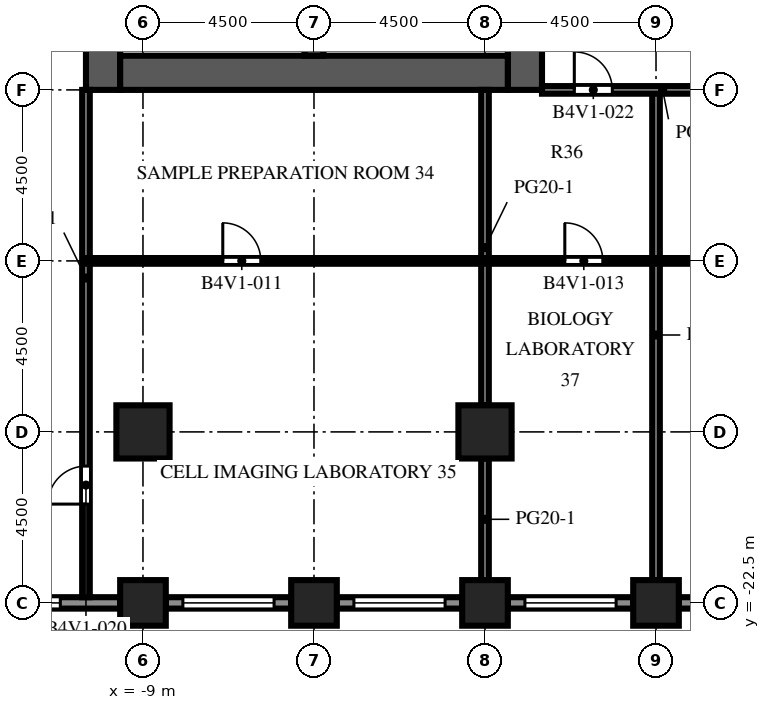
"""IFC4 building model, lengths in metres.
Left out: names, types, materials, properties, quantities, classifications, styles, units other than length and angle.
Written with IfcOpenShell. Run it as: python <this file> out.ifc"""

import sys

from ifc_helpers import new_model, si_unit, direction, frame, frame_2d, origin, origin_2d, place, context, subcontext, project, spatial, rectangle, extrude, element, fill, save


model = new_model("IFC4")
c1 = context("Model", 3, precision=1e-05, world=origin(), true_north=direction((0.0, 1.0)))
c2 = subcontext(c1, "Body", "Model", "MODEL_VIEW")
j1 = project(units=[si_unit("LENGTHUNIT", "METRE"), si_unit("PLANEANGLEUNIT", "RADIAN")], contexts=[c1])
p1 = place(None, origin())
s1 = spatial("IfcSite", under=j1, at=p1, CompositionType="ELEMENT")
p2 = place(p1, origin())
s2 = spatial("IfcBuilding", under=s1, at=p2, CompositionType="ELEMENT")
p3 = place(p2, frame((0.0, 0.0, 129.0)))
s3 = spatial("IfcBuildingStorey", under=s2, at=p3, CompositionType="ELEMENT", Elevation=129.0)
for number, where, z_axis, x_axis in (
    (1, (-9.0, -22.5, 0.0), (0.0, 0.0, 1.0), (1.0, 0.0, 0.0)),
    (2, (-4.5, -22.5, 0.0), (0.0, 0.0, 1.0), (1.0, 0.0, 0.0)),
    (3, (0.0, -22.5, 0.0), (0.0, 0.0, 1.0), (1.0, 0.0, 0.0)),
    (4, (4.5, -22.5, 0.0), (0.0, 0.0, 1.0), (1.0, 0.0, 0.0)),
):
    element("IfcColumn", number, at=place(p3, frame(where, z_axis=z_axis, x_axis=x_axis)), inside=s3, PredefinedType="COLUMN", context=c2, shape_type="SweptSolid", body=[
        extrude(rectangle(XDim=1.2, YDim=1.2, at=origin_2d()), origin(), (0.0, 0.0, 1.0), 4.1),
    ])
for number, where, z_axis, x_axis in (
    (5, (-9.0, -18.0, 0.0), (0.0, 0.0, 1.0), (1.0, 0.0, 0.0)),
    (6, (0.0, -18.0, 0.0), (0.0, 0.0, 1.0), (1.0, 0.0, 0.0)),
):
    element("IfcColumn", number, at=place(p3, frame(where, z_axis=z_axis, x_axis=x_axis)), inside=s3, PredefinedType="COLUMN", context=c2, shape_type="SweptSolid", body=[
        extrude(rectangle(XDim=1.4, YDim=1.4, at=origin_2d()), origin(), (0.0, 0.0, 1.0), 4.1),
    ])
p4 = place(p3, frame((-10.05, -9.0, 0.0), z_axis=(0.0, 0.0, 1.0), x_axis=(0.0, 1.0, 0.0)))
e7 = element("IfcWall", 7, at=p4, inside=s3, PredefinedType="SHEAR", context=c2, shape_type="SweptSolid", body=[
    extrude(rectangle(XDim=27.5, YDim=0.9, at=frame_2d((13.75, 0.0))), origin(), (0.0, 0.0, 1.0), 4.1),
])
p5 = place(p4, frame((12.55, 0.0, 0.0)))
e8 = element("IfcOpeningElement", 8, at=p5, cuts=e7, PredefinedType="OPENING", context=c2, shape_type="SweptSolid", body=[
    extrude(rectangle(XDim=2.4, YDim=2.4, at=frame_2d((1.2, 1.2))), frame((0.0, 0.46, 0.0), z_axis=(0.0, -1.0, 0.0), x_axis=(1.0, 0.0, 0.0)), (0.0, 0.0, 1.0), 0.92),
])
p6 = place(p4, frame((6.825, 0.0, 0.0)))
e9 = element("IfcOpeningElement", 9, at=p6, cuts=e7, PredefinedType="OPENING", context=c2, shape_type="SweptSolid", body=[
    extrude(rectangle(XDim=1.2, YDim=2.1, at=frame_2d((0.6, 1.05))), frame((0.0, 0.46, 0.0), z_axis=(0.0, -1.0, 0.0), x_axis=(1.0, 0.0, 0.0)), (0.0, 0.0, 1.0), 0.92),
])
p7 = place(p4, frame((19.475, 0.0, 0.0)))
e10 = element("IfcOpeningElement", 10, at=p7, cuts=e7, PredefinedType="OPENING", context=c2, shape_type="SweptSolid", body=[
    extrude(rectangle(XDim=1.2, YDim=2.1, at=frame_2d((0.6, 1.05))), frame((0.0, 0.46, 0.0), z_axis=(0.0, -1.0, 0.0), x_axis=(1.0, 0.0, 0.0)), (0.0, 0.0, 1.0), 0.92),
])
p8 = place(p3, frame((1.05, -9.0, 0.0), z_axis=(0.0, 0.0, 1.0), x_axis=(0.0, 1.0, 0.0)))
e11 = element("IfcWall", 11, at=p8, inside=s3, PredefinedType="SHEAR", context=c2, shape_type="SweptSolid", body=[
    extrude(rectangle(XDim=27.5, YDim=0.9, at=frame_2d((13.75, 0.0))), origin(), (0.0, 0.0, 1.0), 4.1),
])
p9 = place(p8, frame((12.55, 0.0, 0.0)))
e12 = element("IfcOpeningElement", 12, at=p9, cuts=e11, PredefinedType="OPENING", context=c2, shape_type="SweptSolid", body=[
    extrude(rectangle(XDim=2.4, YDim=2.4, at=frame_2d((1.2, 1.2))), frame((0.0, 0.46, 0.0), z_axis=(0.0, -1.0, 0.0), x_axis=(1.0, 0.0, 0.0)), (0.0, 0.0, 1.0), 0.92),
])
p10 = place(p8, frame((3.975, 0.0, 0.0)))
e13 = element("IfcOpeningElement", 13, at=p10, cuts=e11, PredefinedType="OPENING", context=c2, shape_type="SweptSolid", body=[
    extrude(rectangle(XDim=1.2, YDim=2.1, at=frame_2d((0.6, 1.05))), frame((0.0, 0.46, 0.0), z_axis=(0.0, -1.0, 0.0), x_axis=(1.0, 0.0, 0.0)), (0.0, 0.0, 1.0), 0.92),
])
p11 = place(p8, frame((22.325, 0.0, 0.0)))
e14 = element("IfcOpeningElement", 14, at=p11, cuts=e11, PredefinedType="OPENING", context=c2, shape_type="SweptSolid", body=[
    extrude(rectangle(XDim=1.2, YDim=2.1, at=frame_2d((0.6, 1.05))), frame((0.0, 0.46, 0.0), z_axis=(0.0, -1.0, 0.0), x_axis=(1.0, 0.0, 0.0)), (0.0, 0.0, 1.0), 0.92),
])
p12 = place(p3, frame((-9.6, -8.55, 0.0), z_axis=(0.0, 0.0, 1.0), x_axis=(1.0, 0.0, 0.0)))
e15 = element("IfcWall", 15, at=p12, inside=s3, PredefinedType="SHEAR", context=c2, shape_type="SweptSolid", body=[
    extrude(rectangle(XDim=10.2, YDim=0.9, at=frame_2d((5.1, 0.0))), origin(), (0.0, 0.0, 1.0), 4.1),
])
p13 = place(p3, frame((-4.5, -8.1, 0.0), z_axis=(0.0, 0.0, 1.0), x_axis=(0.0, 1.0, 0.0)))
e16 = element("IfcWall", 16, at=p13, inside=s3, PredefinedType="SHEAR", context=c2, shape_type="SweptSolid", body=[
    extrude(rectangle(XDim=7.35, YDim=0.5, at=frame_2d((3.675, 0.0))), origin(), (0.0, 0.0, 1.0), 4.1),
])
p14 = place(p3, frame((-9.6, -22.5, 0.0), z_axis=(0.0, 0.0, 1.0), x_axis=(-1.0, 0.0, 0.0)))
e17 = element("IfcWall", 17, at=p14, inside=s3, PredefinedType="SOLIDWALL", context=c2, shape_type="SweptSolid", body=[
    extrude(rectangle(XDim=3.3, YDim=0.3, at=frame_2d((1.65, 0.0))), origin(), (0.0, 0.0, 1.0), 2.75),
])
p15 = place(p14, frame((1.575, 0.0, 0.8)))
e18 = element("IfcOpeningElement", 18, at=p15, cuts=e17, PredefinedType="OPENING", context=c2, shape_type="SweptSolid", body=[
    extrude(rectangle(XDim=1.2, YDim=1.7, at=frame_2d((0.6, 0.85))), frame((0.0, 0.16, 0.0), z_axis=(0.0, -1.0, 0.0), x_axis=(1.0, 0.0, 0.0)), (0.0, 0.0, 1.0), 0.32),
])
p16 = place(p3, frame((-5.1, -22.5, 0.0), z_axis=(0.0, 0.0, 1.0), x_axis=(-1.0, 0.0, 0.0)))
e19 = element("IfcWall", 19, at=p16, inside=s3, PredefinedType="SOLIDWALL", context=c2, shape_type="SweptSolid", body=[
    extrude(rectangle(XDim=3.3, YDim=0.3, at=frame_2d((1.65, 0.0))), origin(), (0.0, 0.0, 1.0), 2.75),
])
p17 = place(p16, frame((0.45, 0.0, 0.8)))
e20 = element("IfcOpeningElement", 20, at=p17, cuts=e19, PredefinedType="OPENING", context=c2, shape_type="SweptSolid", body=[
    extrude(rectangle(XDim=2.4, YDim=1.7, at=frame_2d((1.2, 0.85))), frame((0.0, 0.16, 0.0), z_axis=(0.0, -1.0, 0.0), x_axis=(1.0, 0.0, 0.0)), (0.0, 0.0, 1.0), 0.32),
])
p18 = place(p3, frame((-0.6, -22.5, 0.0), z_axis=(0.0, 0.0, 1.0), x_axis=(-1.0, 0.0, 0.0)))
e21 = element("IfcWall", 21, at=p18, inside=s3, PredefinedType="SOLIDWALL", context=c2, shape_type="SweptSolid", body=[
    extrude(rectangle(XDim=3.3, YDim=0.3, at=frame_2d((1.65, 0.0))), origin(), (0.0, 0.0, 1.0), 2.75),
])
p19 = place(p18, frame((0.45, 0.0, 0.8)))
e22 = element("IfcOpeningElement", 22, at=p19, cuts=e21, PredefinedType="OPENING", context=c2, shape_type="SweptSolid", body=[
    extrude(rectangle(XDim=2.4, YDim=1.7, at=frame_2d((1.2, 0.85))), frame((0.0, 0.16, 0.0), z_axis=(0.0, -1.0, 0.0), x_axis=(1.0, 0.0, 0.0)), (0.0, 0.0, 1.0), 0.32),
])
p20 = place(p3, frame((3.9, -22.5, 0.0), z_axis=(0.0, 0.0, 1.0), x_axis=(-1.0, 0.0, 0.0)))
e23 = element("IfcWall", 23, at=p20, inside=s3, PredefinedType="SOLIDWALL", context=c2, shape_type="SweptSolid", body=[
    extrude(rectangle(XDim=3.3, YDim=0.3, at=frame_2d((1.65, 0.0))), origin(), (0.0, 0.0, 1.0), 2.75),
])
p21 = place(p20, frame((0.45, 0.0, 0.8)))
e24 = element("IfcOpeningElement", 24, at=p21, cuts=e23, PredefinedType="OPENING", context=c2, shape_type="SweptSolid", body=[
    extrude(rectangle(XDim=2.4, YDim=1.7, at=frame_2d((1.2, 0.85))), frame((0.0, 0.16, 0.0), z_axis=(0.0, -1.0, 0.0), x_axis=(1.0, 0.0, 0.0)), (0.0, 0.0, 1.0), 0.32),
])
p22 = place(p3, frame((8.4, -22.5, 0.0), z_axis=(0.0, 0.0, 1.0), x_axis=(-1.0, 0.0, 0.0)))
e25 = element("IfcWall", 25, at=p22, inside=s3, PredefinedType="SOLIDWALL", context=c2, shape_type="SweptSolid", body=[
    extrude(rectangle(XDim=3.3, YDim=0.3, at=frame_2d((1.65, 0.0))), origin(), (0.0, 0.0, 1.0), 2.75),
])
p23 = place(p22, frame((0.45, 0.0, 0.8)))
e26 = element("IfcOpeningElement", 26, at=p23, cuts=e25, PredefinedType="OPENING", context=c2, shape_type="SweptSolid", body=[
    extrude(rectangle(XDim=2.4, YDim=1.7, at=frame_2d((1.2, 0.85))), frame((0.0, 0.16, 0.0), z_axis=(0.0, -1.0, 0.0), x_axis=(1.0, 0.0, 0.0)), (0.0, 0.0, 1.0), 0.32),
])
p24 = place(p3, frame((-0.9, -8.1, 0.0), z_axis=(0.0, 0.0, 1.0), x_axis=(0.0, 1.0, 0.0)))
e27 = element("IfcWall", 27, at=p24, inside=s3, PredefinedType="PARTITIONING", context=c2, shape_type="SweptSolid", body=[
    extrude(rectangle(XDim=2.205, YDim=0.1, at=frame_2d((1.103, 0.0))), origin(), (0.0, 0.0, 1.0), 3.65),
])
p25 = place(p24, frame((0.603, 0.0, 0.0)))
e28 = element("IfcOpeningElement", 28, at=p25, cuts=e27, PredefinedType="OPENING", context=c2, shape_type="SweptSolid", body=[
    extrude(rectangle(XDim=1.0, YDim=2.1, at=frame_2d((0.5, 1.05))), frame((0.0, 0.06, 0.0), z_axis=(0.0, -1.0, 0.0), x_axis=(1.0, 0.0, 0.0)), (0.0, 0.0, 1.0), 0.12),
])
p26 = place(p3, frame((-10.5, -9.0, 0.0), z_axis=(0.0, 0.0, 1.0), x_axis=(0.0, -1.0, 0.0)))
e29 = element("IfcWall", 29, at=p26, inside=s3, PredefinedType="PARTITIONING", context=c2, shape_type="SweptSolid", body=[
    extrude(rectangle(XDim=13.35, YDim=0.2, at=frame_2d((6.675, 0.0))), origin(), (0.0, 0.0, 1.0), 3.65),
])
p27 = place(p26, frame((9.9, 0.0, 0.0)))
e30 = element("IfcOpeningElement", 30, at=p27, cuts=e29, PredefinedType="OPENING", context=c2, shape_type="SweptSolid", body=[
    extrude(rectangle(XDim=1.0, YDim=2.1, at=frame_2d((0.5, 1.05))), frame((0.0, 0.11, 0.0), z_axis=(0.0, -1.0, 0.0), x_axis=(1.0, 0.0, 0.0)), (0.0, 0.0, 1.0), 0.22),
])
p28 = place(p3, frame((0.0, -21.9, 0.0), z_axis=(0.0, 0.0, 1.0), x_axis=(0.0, 1.0, 0.0)))
e31 = element("IfcWall", 31, at=p28, inside=s3, PredefinedType="PARTITIONING", context=c2, shape_type="SweptSolid", body=[
    extrude(rectangle(XDim=3.2, YDim=0.2, at=frame_2d((1.6, 0.0))), origin(), (0.0, 0.0, 1.0), 3.65),
])
p29 = place(p3, frame((0.0, -17.3, 0.0), z_axis=(0.0, 0.0, 1.0), x_axis=(0.0, 1.0, 0.0)))
e32 = element("IfcWall", 32, at=p29, inside=s3, PredefinedType="PARTITIONING", context=c2, shape_type="SweptSolid", body=[
    extrude(rectangle(XDim=8.3, YDim=0.2, at=frame_2d((4.15, 0.0))), origin(), (0.0, 0.0, 1.0), 3.65),
])
p30 = place(p3, frame((4.5, -21.9, 0.0), z_axis=(0.0, 0.0, 1.0), x_axis=(0.0, 1.0, 0.0)))
e33 = element("IfcWall", 33, at=p30, inside=s3, PredefinedType="PARTITIONING", context=c2, shape_type="SweptSolid", body=[
    extrude(rectangle(XDim=12.9, YDim=0.2, at=frame_2d((6.45, 0.0))), origin(), (0.0, 0.0, 1.0), 3.65),
])
p31 = place(p3, frame((-10.5, -13.5, 0.0), z_axis=(0.0, 0.0, 1.0), x_axis=(1.0, 0.0, 0.0)))
e34 = element("IfcWall", 34, at=p31, inside=s3, PredefinedType="PARTITIONING", context=c2, shape_type="SweptSolid", body=[
    extrude(rectangle(XDim=28.5, YDim=0.15, at=frame_2d((14.25, 0.0))), origin(), (0.0, 0.0, 1.0), 3.65),
])
p32 = place(p31, frame((3.6, 0.0, 0.0)))
e35 = element("IfcOpeningElement", 35, at=p32, cuts=e34, PredefinedType="OPENING", context=c2, shape_type="SweptSolid", body=[
    extrude(rectangle(XDim=1.0, YDim=2.1, at=frame_2d((0.5, 1.05))), frame((0.0, 0.085, 0.0), z_axis=(0.0, -1.0, 0.0), x_axis=(1.0, 0.0, 0.0)), (0.0, 0.0, 1.0), 0.17),
])
p33 = place(p31, frame((12.6, 0.0, 0.0)))
e36 = element("IfcOpeningElement", 36, at=p33, cuts=e34, PredefinedType="OPENING", context=c2, shape_type="SweptSolid", body=[
    extrude(rectangle(XDim=1.0, YDim=2.1, at=frame_2d((0.5, 1.05))), frame((0.0, 0.085, 0.0), z_axis=(0.0, -1.0, 0.0), x_axis=(1.0, 0.0, 0.0)), (0.0, 0.0, 1.0), 0.17),
])
p34 = place(p31, frame((19.35, 0.0, 0.0)))
e37 = element("IfcOpeningElement", 37, at=p34, cuts=e34, PredefinedType="OPENING", context=c2, shape_type="SweptSolid", body=[
    extrude(rectangle(XDim=1.0, YDim=2.1, at=frame_2d((0.5, 1.05))), frame((0.0, 0.085, 0.0), z_axis=(0.0, -1.0, 0.0), x_axis=(1.0, 0.0, 0.0)), (0.0, 0.0, 1.0), 0.17),
])
p35 = place(p3, frame((6.0, -9.0, 0.0), z_axis=(0.0, 0.0, 1.0), x_axis=(-1.0, 0.0, 0.0)))
e38 = element("IfcWall", 38, at=p35, inside=s3, PredefinedType="PARTITIONING", context=c2, shape_type="SweptSolid", body=[
    extrude(rectangle(XDim=4.5, YDim=0.2, at=frame_2d((2.25, 0.0))), origin(), (0.0, 0.0, 1.0), 3.65),
])
p36 = place(p35, frame((2.65, 0.0, 0.0)))
e39 = element("IfcOpeningElement", 39, at=p36, cuts=e38, PredefinedType="OPENING", context=c2, shape_type="SweptSolid", body=[
    extrude(rectangle(XDim=1.0, YDim=2.1, at=frame_2d((0.5, 1.05))), frame((0.0, 0.11, 0.0), z_axis=(0.0, -1.0, 0.0), x_axis=(1.0, 0.0, 0.0)), (0.0, 0.0, 1.0), 0.22),
])
p37 = place(p15, origin())
e40 = element("IfcWindow", 40, at=p37, inside=s3, PartitioningType="SINGLE_PANEL", PredefinedType="WINDOW", context=c2, shape_type="SweptSolid", body=[
    extrude(rectangle(XDim=1.2, YDim=1.7, at=frame_2d((0.6, 0.85))), frame((0.0, 0.03, 0.0), z_axis=(0.0, -1.0, 0.0), x_axis=(1.0, 0.0, 0.0)), (0.0, 0.0, 1.0), 0.06),
])
fill(e18, e40)
p38 = place(p17, origin())
e41 = element("IfcWindow", 41, at=p38, inside=s3, PartitioningType="SINGLE_PANEL", PredefinedType="WINDOW", context=c2, shape_type="SweptSolid", body=[
    extrude(rectangle(XDim=2.4, YDim=1.7, at=frame_2d((1.2, 0.85))), frame((0.0, 0.03, 0.0), z_axis=(0.0, -1.0, 0.0), x_axis=(1.0, 0.0, 0.0)), (0.0, 0.0, 1.0), 0.06),
])
fill(e20, e41)
p39 = place(p19, origin())
e42 = element("IfcWindow", 42, at=p39, inside=s3, PartitioningType="SINGLE_PANEL", PredefinedType="WINDOW", context=c2, shape_type="SweptSolid", body=[
    extrude(rectangle(XDim=2.4, YDim=1.7, at=frame_2d((1.2, 0.85))), frame((0.0, 0.03, 0.0), z_axis=(0.0, -1.0, 0.0), x_axis=(1.0, 0.0, 0.0)), (0.0, 0.0, 1.0), 0.06),
])
fill(e22, e42)
p40 = place(p21, origin())
e43 = element("IfcWindow", 43, at=p40, inside=s3, PartitioningType="SINGLE_PANEL", PredefinedType="WINDOW", context=c2, shape_type="SweptSolid", body=[
    extrude(rectangle(XDim=2.4, YDim=1.7, at=frame_2d((1.2, 0.85))), frame((0.0, 0.03, 0.0), z_axis=(0.0, -1.0, 0.0), x_axis=(1.0, 0.0, 0.0)), (0.0, 0.0, 1.0), 0.06),
])
fill(e24, e43)
p41 = place(p32, origin())
e44 = element("IfcDoor", 44, at=p41, inside=s3, OperationType="SINGLE_SWING_LEFT", PredefinedType="DOOR", context=c2, shape_type="SweptSolid", body=[
    extrude(rectangle(XDim=1.0, YDim=2.1, at=frame_2d((0.5, 1.05))), frame((0.0, 0.025, 0.0), z_axis=(0.0, -1.0, 0.0), x_axis=(1.0, 0.0, 0.0)), (0.0, 0.0, 1.0), 0.05),
])
fill(e35, e44)
p42 = place(p33, origin())
e45 = element("IfcDoor", 45, at=p42, inside=s3, OperationType="SINGLE_SWING_LEFT", PredefinedType="DOOR", context=c2, shape_type="SweptSolid", body=[
    extrude(rectangle(XDim=1.0, YDim=2.1, at=frame_2d((0.5, 1.05))), frame((0.0, 0.025, 0.0), z_axis=(0.0, -1.0, 0.0), x_axis=(1.0, 0.0, 0.0)), (0.0, 0.0, 1.0), 0.05),
])
fill(e36, e45)
p43 = place(p27, origin())
e46 = element("IfcDoor", 46, at=p43, inside=s3, OperationType="SINGLE_SWING_RIGHT", PredefinedType="DOOR", context=c2, shape_type="SweptSolid", body=[
    extrude(rectangle(XDim=1.0, YDim=2.1, at=frame_2d((0.5, 1.05))), frame((0.0, 0.025, 0.0), z_axis=(0.0, -1.0, 0.0), x_axis=(1.0, 0.0, 0.0)), (0.0, 0.0, 1.0), 0.05),
])
fill(e30, e46)
p44 = place(p36, origin())
e47 = element("IfcDoor", 47, at=p44, inside=s3, OperationType="SINGLE_SWING_RIGHT", PredefinedType="DOOR", context=c2, shape_type="SweptSolid", body=[
    extrude(rectangle(XDim=1.0, YDim=2.1, at=frame_2d((0.5, 1.05))), frame((0.0, 0.025, 0.0), z_axis=(0.0, -1.0, 0.0), x_axis=(1.0, 0.0, 0.0)), (0.0, 0.0, 1.0), 0.05),
])
fill(e39, e47)
save(model, sys.argv[1])
